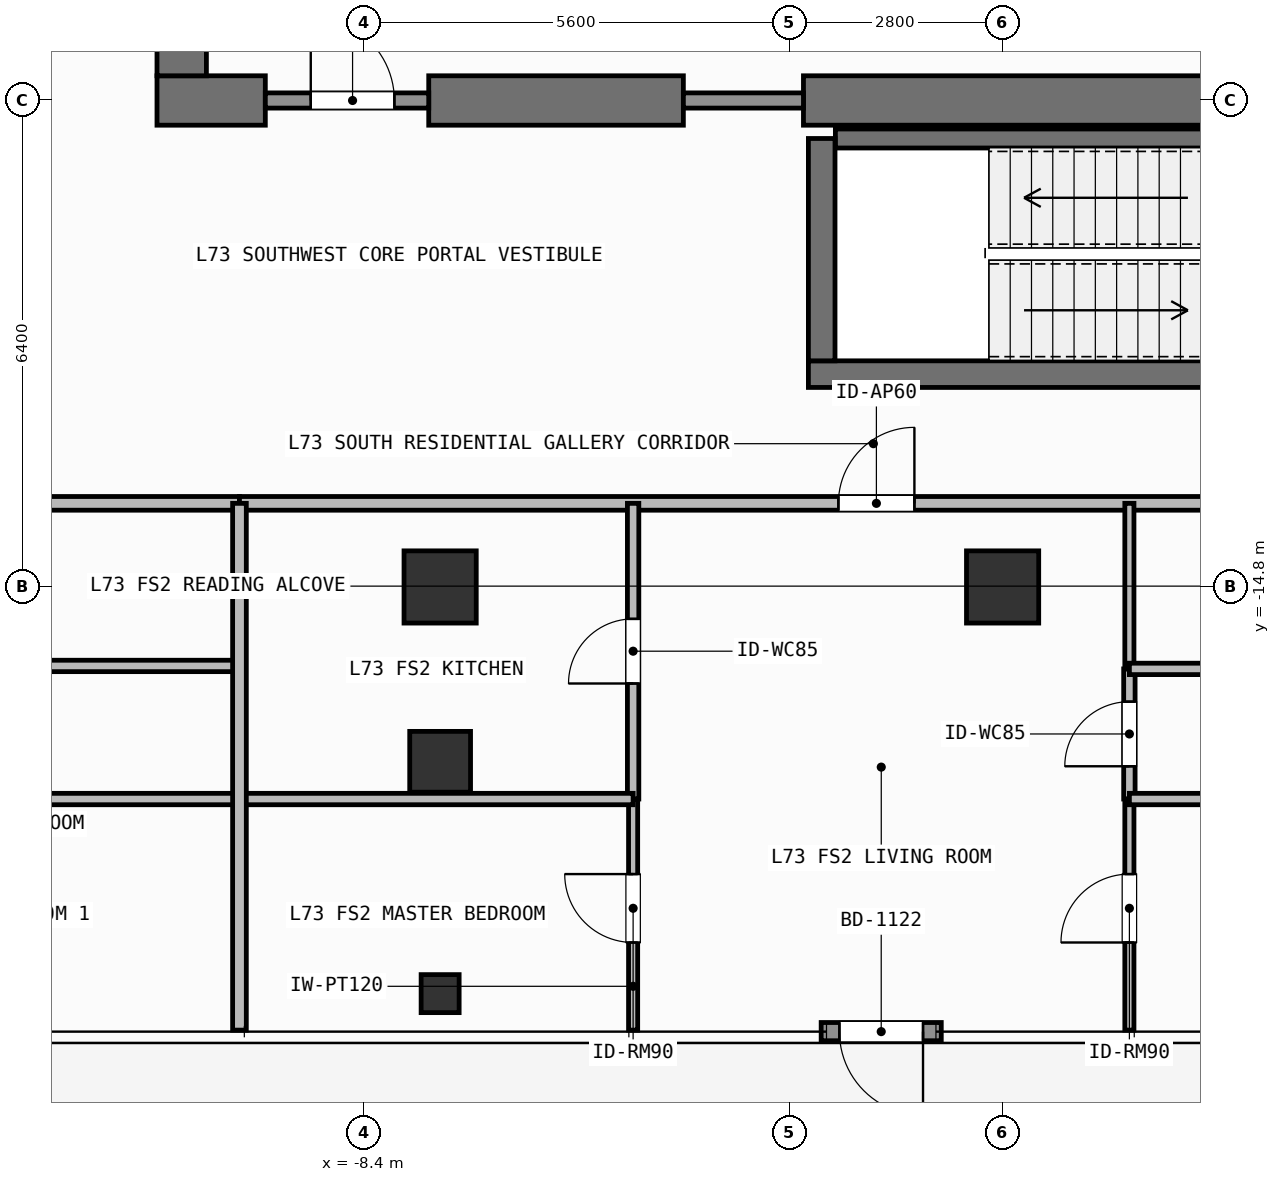
"""IFC4 building model, lengths in metres.
Left out: names, types, materials, properties, quantities, classifications, styles, units other than length and angle.
Written with IfcOpenShell. Run it as: python <this file> out.ifc"""

import sys

from ifc_helpers import new_model, si_unit, direction, frame, frame_2d, origin, origin_2d, place, context, subcontext, project, spatial, rectangle, hollow_rectangle, extrude, element, fill, save


model = new_model("IFC4")
c1 = context("Model", 3, precision=1e-05, world=origin(), true_north=direction((0.0, 1.0)))
c2 = subcontext(c1, "Body", "Model", "MODEL_VIEW")
j1 = project(units=[si_unit("LENGTHUNIT", "METRE"), si_unit("PLANEANGLEUNIT", "RADIAN")], contexts=[c1])
p1 = place(None, origin())
s1 = spatial("IfcSite", under=j1, at=p1, CompositionType="ELEMENT")
p2 = place(p1, origin())
s2 = spatial("IfcBuilding", under=s1, at=p2, CompositionType="ELEMENT")
p3 = place(p2, frame((0.0, 0.0, 297.6)))
s3 = spatial("IfcBuildingStorey", under=s2, at=p3, CompositionType="ELEMENT", Elevation=297.6)
p4 = place(p3, frame((-11.125, -8.4, 0.0), z_axis=(0.0, 0.0, 1.0), x_axis=(1.0, 0.0, 0.0)))
e1 = element("IfcWall", 1, at=p4, inside=s3, PredefinedType="SHEAR", context=c2, shape_type="SweptSolid", body=[
    extrude(rectangle(XDim=1.425, YDim=0.65, at=frame_2d((0.712, 0.0))), origin(), (0.0, 0.0, 1.0), 3.9),
])
p5 = place(p3, frame((-7.55, -8.4, 0.0), z_axis=(0.0, 0.0, 1.0), x_axis=(1.0, 0.0, 0.0)))
e2 = element("IfcWall", 2, at=p5, inside=s3, PredefinedType="SHEAR", context=c2, shape_type="SweptSolid", body=[
    extrude(rectangle(XDim=3.35, YDim=0.65, at=frame_2d((1.675, 0.0))), origin(), (0.0, 0.0, 1.0), 3.9),
])
p6 = place(p3, frame((-2.62, -8.4, 0.0), z_axis=(0.0, 0.0, 1.0), x_axis=(1.0, 0.0, 0.0)))
e3 = element("IfcWall", 3, at=p6, inside=s3, PredefinedType="SHEAR", context=c2, shape_type="SweptSolid", body=[
    extrude(rectangle(XDim=7.27, YDim=0.65, at=frame_2d((3.635, 0.0))), origin(), (0.0, 0.0, 1.0), 3.9),
])
p7 = place(p3, frame((-10.8, -8.075, 0.0), z_axis=(0.0, 0.0, 1.0), x_axis=(0.0, 1.0, 0.0)))
e4 = element("IfcWall", 4, at=p7, inside=s3, PredefinedType="SHEAR", context=c2, shape_type="SweptSolid", body=[
    extrude(rectangle(XDim=16.15, YDim=0.65, at=frame_2d((8.075, 0.0))), origin(), (0.0, 0.0, 1.0), 3.9),
])
p8 = place(p3, frame((-2.555, -12.0, 0.0), z_axis=(0.0, 0.0, 1.0), x_axis=(1.0, 0.0, 0.0)))
e5 = element("IfcWall", 5, at=p8, inside=s3, PredefinedType="SHEAR", context=c2, shape_type="SweptSolid", body=[
    extrude(rectangle(XDim=7.31, YDim=0.35, at=frame_2d((3.655, 0.0))), origin(), (0.0, 0.0, 1.0), 3.9),
])
p9 = place(p3, frame((-2.2, -8.9, 0.0), z_axis=(0.0, 0.0, 1.0), x_axis=(1.0, 0.0, 0.0)))
e6 = element("IfcWall", 6, at=p9, inside=s3, PredefinedType="SHEAR", context=c2, shape_type="SweptSolid", body=[
    extrude(rectangle(XDim=6.6, YDim=0.25, at=frame_2d((3.3, 0.0))), origin(), (0.0, 0.0, 1.0), 3.9),
])
p10 = place(p3, frame((-2.38, -11.825, 0.0), z_axis=(0.0, 0.0, 1.0), x_axis=(0.0, 1.0, 0.0)))
e7 = element("IfcWall", 7, at=p10, inside=s3, PredefinedType="SHEAR", context=c2, shape_type="SweptSolid", body=[
    extrude(rectangle(XDim=2.925, YDim=0.35, at=frame_2d((1.462, 0.0))), origin(), (0.0, 0.0, 1.0), 3.9),
])
for number, where, z_axis, x_axis in (
    (8, (-7.4, -14.8, 0.0), (0.0, 0.0, 1.0), (1.0, 0.0, 0.0)),
    (9, (0.0, -14.8, 0.0), (0.0, 0.0, 1.0), (1.0, 0.0, 0.0)),
):
    element("IfcColumn", number, at=place(p3, frame(where, z_axis=z_axis, x_axis=x_axis)), inside=s3, PredefinedType="COLUMN", context=c2, shape_type="SweptSolid", body=[
        extrude(rectangle(XDim=0.95, YDim=0.95, at=origin_2d()), origin(), (0.0, 0.0, 1.0), 3.9),
    ])
p11 = place(p3, frame((-7.4, -17.1, 0.0), z_axis=(0.0, 0.0, 1.0), x_axis=(1.0, 0.0, 0.0)))
e10 = element("IfcColumn", 10, at=p11, inside=s3, PredefinedType="COLUMN", context=c2, shape_type="SweptSolid", body=[
    extrude(hollow_rectangle(XDim=0.8, YDim=0.8, WallThickness=0.036, at=origin_2d()), origin(), (0.0, 0.0, 1.0), 3.9),
])
p12 = place(p3, frame((-7.4, -20.15, 0.0), z_axis=(0.0, 0.0, 1.0), x_axis=(1.0, 0.0, 0.0)))
e11 = element("IfcColumn", 11, at=p12, inside=s3, PredefinedType="COLUMN", context=c2, shape_type="SweptSolid", body=[
    extrude(hollow_rectangle(XDim=0.5, YDim=0.5, WallThickness=0.025, at=origin_2d()), origin(), (0.0, 0.0, 1.0), 3.9),
])
p13 = place(p3, frame((-0.807, -20.65, 0.0), z_axis=(0.0, 0.0, 1.0), x_axis=(-1.0, 0.0, 0.0)))
e12 = element("IfcWall", 12, at=p13, inside=s3, PredefinedType="SOLIDWALL", context=c2, shape_type="SweptSolid", body=[
    extrude(rectangle(XDim=1.58, YDim=0.24, at=frame_2d((0.79, 0.0))), origin(), (0.0, 0.0, 1.0), 3.68),
])
p14 = place(p13, frame((0.24, 0.0, 0.0)))
e13 = element("IfcOpeningElement", 13, at=p14, cuts=e12, PredefinedType="OPENING", context=c2, shape_type="SweptSolid", body=[
    extrude(rectangle(XDim=1.1, YDim=2.2, at=frame_2d((0.55, 1.1))), frame((0.0, 0.13, 0.0), z_axis=(0.0, -1.0, 0.0), x_axis=(1.0, 0.0, 0.0)), (0.0, 0.0, 1.0), 0.26),
])
p15 = place(p3, frame((-9.7, -8.4, 0.0), z_axis=(0.0, 0.0, 1.0), x_axis=(1.0, 0.0, 0.0)))
e14 = element("IfcWall", 14, at=p15, inside=s3, PredefinedType="SOLIDWALL", context=c2, shape_type="SweptSolid", body=[
    extrude(rectangle(XDim=2.15, YDim=0.2, at=frame_2d((1.075, 0.0))), origin(), (0.0, 0.0, 1.0), 2.92),
])
p16 = place(p15, frame((0.598, 0.0, 0.0)))
e15 = element("IfcOpeningElement", 15, at=p16, cuts=e14, PredefinedType="OPENING", context=c2, shape_type="SweptSolid", body=[
    extrude(rectangle(XDim=1.1, YDim=2.15, at=frame_2d((0.55, 1.075))), frame((0.0, 0.11, 0.0), z_axis=(0.0, -1.0, 0.0), x_axis=(1.0, 0.0, 0.0)), (0.0, 0.0, 1.0), 0.22),
])
p17 = place(p3, frame((-19.32, -13.7, 0.0), z_axis=(0.0, 0.0, 1.0), x_axis=(1.0, 0.0, 0.0)))
e16 = element("IfcWall", 16, at=p17, inside=s3, PredefinedType="PARTITIONING", context=c2, shape_type="SweptSolid", body=[
    extrude(rectangle(XDim=9.28, YDim=0.18, at=frame_2d((4.64, 0.0))), origin(), (0.0, 0.0, 1.0), 3.68),
])
p18 = place(p17, frame((1.398, 0.0, 0.0)))
e17 = element("IfcOpeningElement", 17, at=p18, cuts=e16, PredefinedType="OPENING", context=c2, shape_type="SweptSolid", body=[
    extrude(rectangle(XDim=1.0, YDim=2.2, at=frame_2d((0.5, 1.1))), frame((0.0, 0.1, 0.0), z_axis=(0.0, -1.0, 0.0), x_axis=(1.0, 0.0, 0.0)), (0.0, 0.0, 1.0), 0.2),
])
p19 = place(p3, frame((-10.04, -13.7, 0.0), z_axis=(0.0, 0.0, 1.0), x_axis=(1.0, 0.0, 0.0)))
e18 = element("IfcWall", 18, at=p19, inside=s3, PredefinedType="PARTITIONING", context=c2, shape_type="SweptSolid", body=[
    extrude(rectangle(XDim=15.323, YDim=0.18, at=frame_2d((7.662, 0.0))), origin(), (0.0, 0.0, 1.0), 3.68),
])
p20 = place(p19, frame((7.88, 0.0, 0.0)))
e19 = element("IfcOpeningElement", 19, at=p20, cuts=e18, PredefinedType="OPENING", context=c2, shape_type="SweptSolid", body=[
    extrude(rectangle(XDim=1.0, YDim=2.2, at=frame_2d((0.5, 1.1))), frame((0.0, 0.1, 0.0), z_axis=(0.0, -1.0, 0.0), x_axis=(1.0, 0.0, 0.0)), (0.0, 0.0, 1.0), 0.2),
])
p21 = place(p3, frame((-4.861, -17.59, 0.0), z_axis=(0.0, 0.0, 1.0), x_axis=(0.0, 1.0, 0.0)))
e20 = element("IfcWall", 20, at=p21, inside=s3, PredefinedType="PARTITIONING", context=c2, shape_type="SweptSolid", body=[
    extrude(rectangle(XDim=3.89, YDim=0.15, at=frame_2d((1.945, 0.0))), origin(), (0.0, 0.0, 1.0), 3.68),
])
p22 = place(p21, frame((1.52, 0.0, 0.0)))
e21 = element("IfcOpeningElement", 21, at=p22, cuts=e20, PredefinedType="OPENING", context=c2, shape_type="SweptSolid", body=[
    extrude(rectangle(XDim=0.85, YDim=2.1, at=frame_2d((0.425, 1.05))), frame((0.0, 0.085, 0.0), z_axis=(0.0, -1.0, 0.0), x_axis=(1.0, 0.0, 0.0)), (0.0, 0.0, 1.0), 0.17),
])
p23 = place(p3, frame((-4.861, -20.63, 0.0), z_axis=(0.0, 0.0, 1.0), x_axis=(0.0, 1.0, 0.0)))
e22 = element("IfcWall", 22, at=p23, inside=s3, PredefinedType="PARTITIONING", context=c2, shape_type="SweptSolid", body=[
    extrude(rectangle(XDim=3.04, YDim=0.12, at=frame_2d((1.52, 0.0))), origin(), (0.0, 0.0, 1.0), 3.68),
])
p24 = place(p23, frame((1.153, 0.0, 0.0)))
e23 = element("IfcOpeningElement", 23, at=p24, cuts=e22, PredefinedType="OPENING", context=c2, shape_type="SweptSolid", body=[
    extrude(rectangle(XDim=0.9, YDim=2.1, at=frame_2d((0.45, 1.05))), frame((0.0, 0.07, 0.0), z_axis=(0.0, -1.0, 0.0), x_axis=(1.0, 0.0, 0.0)), (0.0, 0.0, 1.0), 0.14),
])
p25 = place(p3, frame((1.668, -17.59, 0.0), z_axis=(0.0, 0.0, 1.0), x_axis=(0.0, 1.0, 0.0)))
e24 = element("IfcWall", 24, at=p25, inside=s3, PredefinedType="PARTITIONING", context=c2, shape_type="SweptSolid", body=[
    extrude(rectangle(XDim=1.712, YDim=0.15, at=frame_2d((0.856, 0.0))), origin(), (0.0, 0.0, 1.0), 3.68),
])
p26 = place(p25, frame((0.431, 0.0, 0.0)))
e25 = element("IfcOpeningElement", 25, at=p26, cuts=e24, PredefinedType="OPENING", context=c2, shape_type="SweptSolid", body=[
    extrude(rectangle(XDim=0.85, YDim=2.1, at=frame_2d((0.425, 1.05))), frame((0.0, 0.085, 0.0), z_axis=(0.0, -1.0, 0.0), x_axis=(1.0, 0.0, 0.0)), (0.0, 0.0, 1.0), 0.17),
])
p27 = place(p3, frame((1.668, -15.878, 0.0), z_axis=(0.0, 0.0, 1.0), x_axis=(0.0, 1.0, 0.0)))
e26 = element("IfcWall", 26, at=p27, inside=s3, PredefinedType="PARTITIONING", context=c2, shape_type="SweptSolid", body=[
    extrude(rectangle(XDim=2.178, YDim=0.12, at=frame_2d((1.089, 0.0))), origin(), (0.0, 0.0, 1.0), 3.68),
])
p28 = place(p3, frame((1.668, -20.63, 0.0), z_axis=(0.0, 0.0, 1.0), x_axis=(0.0, 1.0, 0.0)))
e27 = element("IfcWall", 27, at=p28, inside=s3, PredefinedType="PARTITIONING", context=c2, shape_type="SweptSolid", body=[
    extrude(rectangle(XDim=3.04, YDim=0.12, at=frame_2d((1.52, 0.0))), origin(), (0.0, 0.0, 1.0), 3.68),
])
p29 = place(p28, frame((1.153, 0.0, 0.0)))
e28 = element("IfcOpeningElement", 28, at=p29, cuts=e27, PredefinedType="OPENING", context=c2, shape_type="SweptSolid", body=[
    extrude(rectangle(XDim=0.9, YDim=2.1, at=frame_2d((0.45, 1.05))), frame((0.0, 0.07, 0.0), z_axis=(0.0, -1.0, 0.0), x_axis=(1.0, 0.0, 0.0)), (0.0, 0.0, 1.0), 0.14),
])
p30 = place(p3, frame((-4.2, -8.4, 0.0), z_axis=(0.0, 0.0, 1.0), x_axis=(1.0, 0.0, 0.0)))
e29 = element("IfcWall", 29, at=p30, inside=s3, PredefinedType="SOLIDWALL", context=c2, shape_type="SweptSolid", body=[
    extrude(rectangle(XDim=1.58, YDim=0.2, at=frame_2d((0.79, 0.0))), origin(), (0.0, 0.0, 1.0), 2.92),
])
for number, where, z_axis, x_axis in (
    (30, (-16.57, -15.839, 0.0), (0.0, 0.0, 1.0), (1.0, 0.0, 0.0)),
    (31, (-16.57, -17.59, 0.0), (0.0, 0.0, 1.0), (1.0, 0.0, 0.0)),
):
    element("IfcWall", number, at=place(p3, frame(where, z_axis=z_axis, x_axis=x_axis)), inside=s3, PredefinedType="PARTITIONING", context=c2, shape_type="SweptSolid", body=[
        extrude(rectangle(XDim=6.53, YDim=0.15, at=frame_2d((3.265, 0.0))), origin(), (0.0, 0.0, 1.0), 3.68),
    ])
p31 = place(p3, frame((-10.04, -17.59, 0.0), z_axis=(0.0, 0.0, 1.0), x_axis=(1.0, 0.0, 0.0)))
e32 = element("IfcWall", 32, at=p31, inside=s3, PredefinedType="PARTITIONING", context=c2, shape_type="SweptSolid", body=[
    extrude(rectangle(XDim=5.179, YDim=0.15, at=frame_2d((2.589, 0.0))), origin(), (0.0, 0.0, 1.0), 3.68),
])
p32 = place(p3, frame((1.668, -15.878, 0.0), z_axis=(0.0, 0.0, 1.0), x_axis=(1.0, 0.0, 0.0)))
e33 = element("IfcWall", 33, at=p32, inside=s3, PredefinedType="PARTITIONING", context=c2, shape_type="SweptSolid", body=[
    extrude(rectangle(XDim=3.615, YDim=0.15, at=frame_2d((1.808, 0.0))), origin(), (0.0, 0.0, 1.0), 3.68),
])
p33 = place(p32, frame((1.383, 0.0, 0.0)))
e34 = element("IfcOpeningElement", 34, at=p33, cuts=e33, PredefinedType="OPENING", context=c2, shape_type="SweptSolid", body=[
    extrude(rectangle(XDim=0.85, YDim=2.1, at=frame_2d((0.425, 1.05))), frame((0.0, 0.085, 0.0), z_axis=(0.0, -1.0, 0.0), x_axis=(1.0, 0.0, 0.0)), (0.0, 0.0, 1.0), 0.17),
])
p34 = place(p3, frame((1.668, -17.59, 0.0), z_axis=(0.0, 0.0, 1.0), x_axis=(1.0, 0.0, 0.0)))
e35 = element("IfcWall", 35, at=p34, inside=s3, PredefinedType="PARTITIONING", context=c2, shape_type="SweptSolid", body=[
    extrude(rectangle(XDim=3.615, YDim=0.15, at=frame_2d((1.808, 0.0))), origin(), (0.0, 0.0, 1.0), 3.68),
])
p35 = place(p3, frame((-10.04, -20.63, 0.0), z_axis=(0.0, 0.0, 1.0), x_axis=(0.0, 1.0, 0.0)))
e36 = element("IfcWall", 36, at=p35, inside=s3, PredefinedType="PARTITIONING", context=c2, shape_type="SweptSolid", body=[
    extrude(rectangle(XDim=6.93, YDim=0.18, at=frame_2d((3.465, 0.0))), origin(), (0.0, 0.0, 1.0), 3.68),
])
p36 = place(p14, origin())
e37 = element("IfcDoor", 37, at=p36, inside=s3, OperationType="SINGLE_SWING_LEFT", PredefinedType="DOOR", context=c2, shape_type="SweptSolid", body=[
    extrude(rectangle(XDim=1.1, YDim=2.2, at=frame_2d((0.55, 1.1))), frame((0.0, 0.025, 0.0), z_axis=(0.0, -1.0, 0.0), x_axis=(1.0, 0.0, 0.0)), (0.0, 0.0, 1.0), 0.05),
])
fill(e13, e37)
p37 = place(p16, origin())
e38 = element("IfcDoor", 38, at=p37, inside=s3, OperationType="SINGLE_SWING_LEFT", PredefinedType="DOOR", context=c2, shape_type="SweptSolid", body=[
    extrude(rectangle(XDim=1.1, YDim=2.15, at=frame_2d((0.55, 1.075))), frame((0.0, 0.025, 0.0), z_axis=(0.0, -1.0, 0.0), x_axis=(1.0, 0.0, 0.0)), (0.0, 0.0, 1.0), 0.05),
])
fill(e15, e38)
p38 = place(p20, origin())
e39 = element("IfcDoor", 39, at=p38, inside=s3, OperationType="SINGLE_SWING_RIGHT", PredefinedType="DOOR", context=c2, shape_type="SweptSolid", body=[
    extrude(rectangle(XDim=1.0, YDim=2.2, at=frame_2d((0.5, 1.1))), frame((0.0, 0.025, 0.0), z_axis=(0.0, -1.0, 0.0), x_axis=(1.0, 0.0, 0.0)), (0.0, 0.0, 1.0), 0.05),
])
fill(e19, e39)
p39 = place(p22, origin())
e40 = element("IfcDoor", 40, at=p39, inside=s3, OperationType="SINGLE_SWING_LEFT", PredefinedType="DOOR", context=c2, shape_type="SweptSolid", body=[
    extrude(rectangle(XDim=0.85, YDim=2.1, at=frame_2d((0.425, 1.05))), frame((0.0, 0.025, 0.0), z_axis=(0.0, -1.0, 0.0), x_axis=(1.0, 0.0, 0.0)), (0.0, 0.0, 1.0), 0.05),
])
fill(e21, e40)
p40 = place(p24, origin())
e41 = element("IfcDoor", 41, at=p40, inside=s3, OperationType="SINGLE_SWING_RIGHT", PredefinedType="DOOR", context=c2, shape_type="SweptSolid", body=[
    extrude(rectangle(XDim=0.9, YDim=2.1, at=frame_2d((0.45, 1.05))), frame((0.0, 0.025, 0.0), z_axis=(0.0, -1.0, 0.0), x_axis=(1.0, 0.0, 0.0)), (0.0, 0.0, 1.0), 0.05),
])
fill(e23, e41)
p41 = place(p26, origin())
e42 = element("IfcDoor", 42, at=p41, inside=s3, OperationType="SINGLE_SWING_LEFT", PredefinedType="DOOR", context=c2, shape_type="SweptSolid", body=[
    extrude(rectangle(XDim=0.85, YDim=2.1, at=frame_2d((0.425, 1.05))), frame((0.0, 0.025, 0.0), z_axis=(0.0, -1.0, 0.0), x_axis=(1.0, 0.0, 0.0)), (0.0, 0.0, 1.0), 0.05),
])
fill(e25, e42)
p42 = place(p29, origin())
e43 = element("IfcDoor", 43, at=p42, inside=s3, OperationType="SINGLE_SWING_LEFT", PredefinedType="DOOR", context=c2, shape_type="SweptSolid", body=[
    extrude(rectangle(XDim=0.9, YDim=2.1, at=frame_2d((0.45, 1.05))), frame((0.0, 0.025, 0.0), z_axis=(0.0, -1.0, 0.0), x_axis=(1.0, 0.0, 0.0)), (0.0, 0.0, 1.0), 0.05),
])
fill(e28, e43)
save(model, sys.argv[1])
